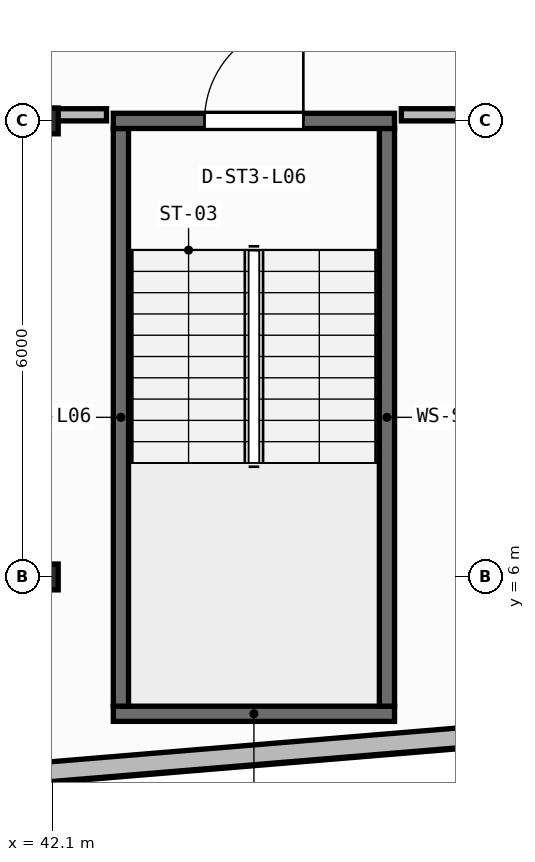
"""IFC4 building model, lengths in metres.
Left out: names, types, materials, properties, quantities, classifications, styles, units other than length and angle.
Written with IfcOpenShell. Run it as: python <this file> out.ifc"""

import sys

from ifc_helpers import new_model, si_unit, direction, frame, frame_2d, origin, origin_2d, place, context, subcontext, project, spatial, rectangle, i_section, extrude, element, fill, save


model = new_model("IFC4")
c1 = context("Model", 3, precision=1e-05, world=origin(), true_north=direction((0.0, 1.0)))
c2 = subcontext(c1, "Body", "Model", "MODEL_VIEW")
j1 = project(units=[si_unit("LENGTHUNIT", "METRE"), si_unit("PLANEANGLEUNIT", "RADIAN")], contexts=[c1])
p1 = place(None, origin())
s1 = spatial("IfcSite", under=j1, at=p1, CompositionType="ELEMENT")
p2 = place(p1, origin())
s2 = spatial("IfcBuilding", under=s1, at=p2, CompositionType="ELEMENT")
p3 = place(p2, frame((0.0, 0.0, 26.45)))
s3 = spatial("IfcBuildingStorey", under=s2, at=p3, CompositionType="ELEMENT", Elevation=26.45)
for number, where, z_axis, x_axis in (
    (1, (42.0, 6.0, 0.0), (0.0, 0.0, 1.0), (1.0, 0.0, 0.0)),
    (2, (42.0, 12.0, 0.0), (0.0, 0.0, 1.0), (1.0, 0.0, 0.0)),
):
    element("IfcColumn", number, at=place(p3, frame(where, z_axis=z_axis, x_axis=x_axis)), inside=s3, PredefinedType="COLUMN", context=c2, shape_type="SweptSolid", body=[
        extrude(i_section(OverallWidth=0.35, OverallDepth=0.34, WebThickness=0.016, FlangeThickness=0.028, at=origin_2d()), origin(), (0.0, 0.0, 1.0), 3.95),
    ])
p4 = place(p3, frame((2.76, 0.174, 0.0), z_axis=(0.0, 0.0, 1.0), x_axis=(0.996571478456, 0.082736257641, 0.0)))
e3 = element("IfcWall", 3, at=p4, inside=s3, PredefinedType="STANDARD", context=c2, shape_type="SweptSolid", body=[
    extrude(rectangle(XDim=52.861, YDim=0.26, at=frame_2d((26.431, 0.0))), origin(), (0.0, 0.0, 1.0), 3.71),
])
p5 = place(p4, frame((25.231, 0.0, 0.9)))
e4 = element("IfcOpeningElement", 4, at=p5, cuts=e3, PredefinedType="OPENING", context=c2, shape_type="SweptSolid", body=[
    extrude(rectangle(XDim=2.4, YDim=1.65, at=frame_2d((1.2, 0.825))), frame((0.0, 0.14, 0.0), z_axis=(0.0, -1.0, 0.0), x_axis=(1.0, 0.0, 0.0)), (0.0, 0.0, 1.0), 0.28),
])
p6 = place(p3, frame((42.9, 4.2, 0.0), z_axis=(0.0, 0.0, 1.0), x_axis=(1.0, 0.0, 0.0)))
e5 = element("IfcWall", 5, at=p6, inside=s3, PredefinedType="SHEAR", context=c2, shape_type="SweptSolid", body=[
    extrude(rectangle(XDim=3.7, YDim=0.2, at=frame_2d((1.85, 0.0))), origin(), (0.0, 0.0, 1.0), 3.71),
])
for number, where, z_axis, x_axis in (
    (6, (43.0, 4.3, 0.0), (0.0, 0.0, 1.0), (0.0, 1.0, 0.0)),
    (7, (46.5, 4.3, 0.0), (0.0, 0.0, 1.0), (0.0, 1.0, 0.0)),
):
    element("IfcWall", number, at=place(p3, frame(where, z_axis=z_axis, x_axis=x_axis)), inside=s3, PredefinedType="SHEAR", context=c2, shape_type="SweptSolid", body=[
        extrude(rectangle(XDim=7.6, YDim=0.2, at=frame_2d((3.8, 0.0))), origin(), (0.0, 0.0, 1.0), 3.71),
    ])
p7 = place(p3, frame((42.9, 12.0, 0.0), z_axis=(0.0, 0.0, 1.0), x_axis=(1.0, 0.0, 0.0)))
e8 = element("IfcWall", 8, at=p7, inside=s3, PredefinedType="SHEAR", context=c2, shape_type="SweptSolid", body=[
    extrude(rectangle(XDim=3.7, YDim=0.2, at=frame_2d((1.85, 0.0))), origin(), (0.0, 0.0, 1.0), 3.71),
])
p8 = place(p7, frame((1.2, 0.0, 0.0)))
e9 = element("IfcOpeningElement", 9, at=p8, cuts=e8, PredefinedType="OPENING", context=c2, shape_type="SweptSolid", body=[
    extrude(rectangle(XDim=1.3, YDim=2.15, at=frame_2d((0.65, 1.075))), frame((0.0, 0.11, 0.0), z_axis=(0.0, -1.0, 0.0), x_axis=(1.0, 0.0, 0.0)), (0.0, 0.0, 1.0), 0.22),
])
p9 = place(p3, frame((31.63, 12.08, 0.0), z_axis=(0.0, 0.0, 1.0), x_axis=(1.0, 0.0, 0.0)))
e10 = element("IfcWall", 10, at=p9, inside=s3, PredefinedType="PARTITIONING", context=c2, shape_type="SweptSolid", body=[
    extrude(rectangle(XDim=11.181, YDim=0.16, at=frame_2d((5.59, 0.0))), origin(), (0.0, 0.0, 1.0), 3.073),
])
p10 = place(p3, frame((46.689, 12.08, 0.0), z_axis=(0.0, 0.0, 1.0), x_axis=(1.0, 0.0, 0.0)))
e11 = element("IfcWall", 11, at=p10, inside=s3, PredefinedType="PARTITIONING", context=c2, shape_type="SweptSolid", body=[
    extrude(rectangle(XDim=3.011, YDim=0.16, at=frame_2d((1.505, 0.0))), origin(), (0.0, 0.0, 1.0), 3.073),
])
p11 = place(p8, origin())
e12 = element("IfcDoor", 12, at=p11, inside=s3, OperationType="SINGLE_SWING_RIGHT", PredefinedType="DOOR", context=c2, shape_type="SweptSolid", body=[
    extrude(rectangle(XDim=1.3, YDim=2.15, at=frame_2d((0.65, 1.075))), frame((0.0, 0.025, 0.0), z_axis=(0.0, -1.0, 0.0), x_axis=(1.0, 0.0, 0.0)), (0.0, 0.0, 1.0), 0.05),
])
fill(e9, e12)
save(model, sys.argv[1])
